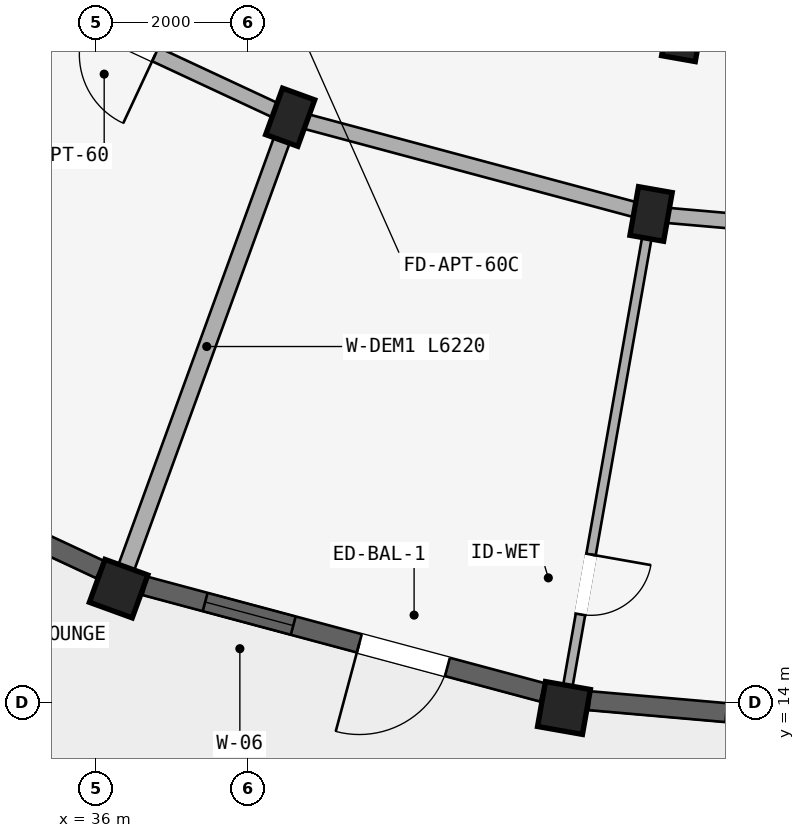
"""IFC4 building model, lengths in metres.
Left out: names, types, materials, properties, quantities, classifications, styles, units other than length and angle.
Written with IfcOpenShell. Run it as: python <this file> out.ifc"""

import sys

from ifc_helpers import new_model, si_unit, direction, frame, frame_2d, origin, origin_2d, place, context, subcontext, project, spatial, rectangle, extrude, element, fill, save


model = new_model("IFC4")
c1 = context("Model", 3, precision=1e-05, world=origin(), true_north=direction((0.0, 1.0)))
c2 = subcontext(c1, "Body", "Model", "MODEL_VIEW")
j1 = project(units=[si_unit("LENGTHUNIT", "METRE"), si_unit("PLANEANGLEUNIT", "RADIAN")], contexts=[c1])
p1 = place(None, origin())
s1 = spatial("IfcSite", under=j1, at=p1, CompositionType="ELEMENT")
p2 = place(p1, origin())
s2 = spatial("IfcBuilding", under=s1, at=p2, CompositionType="ELEMENT")
p3 = place(p2, frame((0.0, 0.0, 30.75)))
s3 = spatial("IfcBuildingStorey", under=s2, at=p3, CompositionType="ELEMENT", Elevation=30.75)
for number, where, z_axis, x_axis in (
    (1, (43.72, 22.792, 0.0), (0.0, 0.0, 1.0), (-0.985, 0.174, 0.0)),
    (2, (43.303, 20.428, 0.0), (0.0, 0.0, 1.0), (-0.985, 0.174, 0.0)),
):
    element("IfcColumn", number, at=place(p3, frame(where, z_axis=z_axis, x_axis=x_axis)), inside=s3, PredefinedType="COLUMN", context=c2, shape_type="SweptSolid", body=[
        extrude(rectangle(XDim=0.45, YDim=0.65, at=origin_2d()), origin(), (0.0, 0.0, 1.0), 2.91),
    ])
p4 = place(p3, frame((42.157, 13.929, 0.0), z_axis=(0.0, 0.0, 1.0), x_axis=(-0.984807753012, 0.173648177667, 0.0)))
e3 = element("IfcColumn", 3, at=p4, inside=s3, PredefinedType="COLUMN", context=c2, shape_type="SweptSolid", body=[
    extrude(rectangle(XDim=0.6, YDim=0.6, at=origin_2d()), origin(), (0.0, 0.0, 1.0), 2.91),
])
p5 = place(p3, frame((38.555, 21.701, 0.0), z_axis=(0.0, 0.0, 1.0), x_axis=(-0.939692620786, 0.342020143326, 0.0)))
e4 = element("IfcColumn", 4, at=p5, inside=s3, PredefinedType="COLUMN", context=c2, shape_type="SweptSolid", body=[
    extrude(rectangle(XDim=0.45, YDim=0.65, at=origin_2d()), origin(), (0.0, 0.0, 1.0), 2.91),
])
p6 = place(p3, frame((36.298, 15.499, 0.0), z_axis=(0.0, 0.0, 1.0), x_axis=(-0.939692620786, 0.342020143326, 0.0)))
e5 = element("IfcColumn", 5, at=p6, inside=s3, PredefinedType="COLUMN", context=c2, shape_type="SweptSolid", body=[
    extrude(rectangle(XDim=0.6, YDim=0.6, at=origin_2d()), origin(), (0.0, 0.0, 1.0), 2.91),
])
p7 = place(p3, frame((48.2, 22.4, 0.0), z_axis=(0.0, 0.0, 1.0), x_axis=(-0.996191949488, 0.087187153726, 0.0)))
e6 = element("IfcWall", 6, at=p7, inside=s3, PredefinedType="STANDARD", context=c2, shape_type="SweptSolid", body=[
    extrude(rectangle(XDim=4.497, YDim=0.2, at=frame_2d((2.249, 0.0))), origin(), (0.0, 0.0, 1.0), 2.352),
])
p8 = place(p7, frame((1.729, 0.0, 0.0)))
e7 = element("IfcOpeningElement", 7, at=p8, cuts=e6, PredefinedType="OPENING", context=c2, shape_type="SweptSolid", body=[
    extrude(rectangle(XDim=1.04, YDim=2.15, at=frame_2d((0.52, 1.075))), frame((0.0, 0.11, 0.0), z_axis=(0.0, -1.0, 0.0), x_axis=(1.0, 0.0, 0.0)), (0.0, 0.0, 1.0), 0.22),
])
p9 = place(p3, frame((48.2, 20.0, 0.0), z_axis=(0.0, 0.0, 1.0), x_axis=(-0.996193663584, 0.087167566415, 0.0)))
e8 = element("IfcWall", 8, at=p9, inside=s3, PredefinedType="STANDARD", context=c2, shape_type="SweptSolid", body=[
    extrude(rectangle(XDim=4.916, YDim=0.2, at=frame_2d((2.458, 0.0))), origin(), (0.0, 0.0, 1.0), 2.352),
])
p10 = place(p9, frame((1.888, 0.0, 0.0)))
e9 = element("IfcOpeningElement", 9, at=p10, cuts=e8, PredefinedType="OPENING", context=c2, shape_type="SweptSolid", body=[
    extrude(rectangle(XDim=1.14, YDim=2.15, at=frame_2d((0.57, 1.075))), frame((0.0, 0.11, 0.0), z_axis=(0.0, -1.0, 0.0), x_axis=(1.0, 0.0, 0.0)), (0.0, 0.0, 1.0), 0.22),
])
p11 = place(p3, frame((43.303, 20.428, 0.0), z_axis=(0.0, 0.0, 1.0), x_axis=(-0.965930095386, 0.258803112091, 0.0)))
e10 = element("IfcWall", 10, at=p11, inside=s3, PredefinedType="STANDARD", context=c2, shape_type="SweptSolid", body=[
    extrude(rectangle(XDim=4.916, YDim=0.2, at=frame_2d((2.458, 0.0))), origin(), (0.0, 0.0, 1.0), 2.352),
])
p12 = place(p3, frame((38.555, 21.701, 0.0), z_axis=(0.0, 0.0, 1.0), x_axis=(-0.906302381024, 0.422629854778, 0.0)))
e11 = element("IfcWall", 11, at=p12, inside=s3, PredefinedType="STANDARD", context=c2, shape_type="SweptSolid", body=[
    extrude(rectangle(XDim=4.915, YDim=0.2, at=frame_2d((2.458, 0.0))), origin(), (0.0, 0.0, 1.0), 2.352),
])
p13 = place(p12, frame((1.958, 0.0, 0.0)))
e12 = element("IfcOpeningElement", 12, at=p13, cuts=e11, PredefinedType="OPENING", context=c2, shape_type="SweptSolid", body=[
    extrude(rectangle(XDim=1.0, YDim=2.15, at=frame_2d((0.5, 1.075))), frame((0.0, 0.11, 0.0), z_axis=(0.0, -1.0, 0.0), x_axis=(1.0, 0.0, 0.0)), (0.0, 0.0, 1.0), 0.22),
])
p14 = place(p3, frame((43.286, 20.33, 0.0), z_axis=(0.0, 0.0, 1.0), x_axis=(-0.173646504755, -0.98480804799, 0.0)))
e13 = element("IfcWall", 13, at=p14, inside=s3, PredefinedType="PARTITIONING", context=c2, shape_type="SweptSolid", body=[
    extrude(rectangle(XDim=6.22, YDim=0.125, at=frame_2d((3.11, 0.0))), origin(), (0.0, 0.0, 1.0), 2.352),
])
p15 = place(p14, frame((4.45, 0.0, 0.0)))
e14 = element("IfcOpeningElement", 14, at=p15, cuts=e13, PredefinedType="OPENING", context=c2, shape_type="SweptSolid", body=[
    extrude(rectangle(XDim=0.8, YDim=2.1, at=frame_2d((0.4, 1.05))), frame((0.0, 0.073, 0.0), z_axis=(0.0, -1.0, 0.0), x_axis=(1.0, 0.0, 0.0)), (0.0, 0.0, 1.0), 0.145),
])
p16 = place(p3, frame((38.521, 21.607, 0.0), z_axis=(0.0, 0.0, 1.0), x_axis=(-0.341992021352, -0.939702855871, 0.0)))
e15 = element("IfcWall", 15, at=p16, inside=s3, PredefinedType="STANDARD", context=c2, shape_type="SweptSolid", body=[
    extrude(rectangle(XDim=6.22, YDim=0.22, at=frame_2d((3.11, 0.0))), origin(), (0.0, 0.0, 1.0), 2.352),
])
p17 = place(p3, frame((48.066, 13.537, 0.0), z_axis=(0.0, 0.0, 1.0), x_axis=(-0.996192628107, 0.087179399543, 0.0)))
e16 = element("IfcWall", 16, at=p17, inside=s3, PredefinedType="STANDARD", context=c2, shape_type="SweptSolid", body=[
    extrude(rectangle(XDim=5.595, YDim=0.25, at=frame_2d((2.798, 0.0))), origin(), (0.0, 0.0, 1.0), 2.352),
])
p18 = place(p17, frame((1.988, 0.0, 0.502)))
e17 = element("IfcOpeningElement", 17, at=p18, cuts=e16, PredefinedType="OPENING", context=c2, shape_type="SweptSolid", body=[
    extrude(rectangle(XDim=1.8, YDim=1.65, at=frame_2d((0.9, 0.825))), frame((0.0, 0.135, 0.0), z_axis=(0.0, -1.0, 0.0), x_axis=(1.0, 0.0, 0.0)), (0.0, 0.0, 1.0), 0.27),
])
p19 = place(p3, frame((41.875, 14.134, 0.0), z_axis=(0.0, 0.0, 1.0), x_axis=(-0.965928932241, 0.258807453254, 0.0)))
e18 = element("IfcWall", 18, at=p19, inside=s3, PredefinedType="STANDARD", context=c2, shape_type="SweptSolid", body=[
    extrude(rectangle(XDim=5.415, YDim=0.25, at=frame_2d((2.708, 0.0))), origin(), (0.0, 0.0, 1.0), 2.352),
])
p20 = place(p19, frame((3.395, 0.0, 0.402)))
e19 = element("IfcOpeningElement", 19, at=p20, cuts=e18, PredefinedType="OPENING", context=c2, shape_type="SweptSolid", body=[
    extrude(rectangle(XDim=1.2, YDim=1.5, at=frame_2d((0.6, 0.75))), frame((0.0, 0.135, 0.0), z_axis=(0.0, -1.0, 0.0), x_axis=(1.0, 0.0, 0.0)), (0.0, 0.0, 1.0), 0.27),
])
p21 = place(p19, frame((1.295, 0.0, 0.0)))
e20 = element("IfcOpeningElement", 20, at=p21, cuts=e18, PredefinedType="OPENING", context=c2, shape_type="SweptSolid", body=[
    extrude(rectangle(XDim=1.2, YDim=2.15, at=frame_2d((0.6, 1.075))), frame((0.0, 0.135, 0.0), z_axis=(0.0, -1.0, 0.0), x_axis=(1.0, 0.0, 0.0)), (0.0, 0.0, 1.0), 0.27),
])
p22 = place(p3, frame((36.055, 15.75, 0.0), z_axis=(0.0, 0.0, 1.0), x_axis=(-0.90629483869, 0.42264602845, 0.0)))
e21 = element("IfcWall", 21, at=p22, inside=s3, PredefinedType="STANDARD", context=c2, shape_type="SweptSolid", body=[
    extrude(rectangle(XDim=5.415, YDim=0.25, at=frame_2d((2.708, 0.0))), origin(), (0.0, 0.0, 1.0), 2.352),
])
p23 = place(p22, frame((1.807, 0.0, 0.502)))
e22 = element("IfcOpeningElement", 22, at=p23, cuts=e21, PredefinedType="OPENING", context=c2, shape_type="SweptSolid", body=[
    extrude(rectangle(XDim=1.8, YDim=1.65, at=frame_2d((0.9, 0.825))), frame((0.0, 0.135, 0.0), z_axis=(0.0, -1.0, 0.0), x_axis=(1.0, 0.0, 0.0)), (0.0, 0.0, 1.0), 0.27),
])
p24 = place(p20, origin())
e23 = element("IfcWindow", 23, at=p24, inside=s3, PartitioningType="SINGLE_PANEL", PredefinedType="WINDOW", context=c2, shape_type="SweptSolid", body=[
    extrude(rectangle(XDim=1.2, YDim=1.5, at=frame_2d((0.6, 0.75))), frame((0.0, 0.03, 0.0), z_axis=(0.0, -1.0, 0.0), x_axis=(1.0, 0.0, 0.0)), (0.0, 0.0, 1.0), 0.06),
])
fill(e19, e23)
p25 = place(p15, origin())
e24 = element("IfcDoor", 24, at=p25, inside=s3, OperationType="SINGLE_SWING_LEFT", PredefinedType="DOOR", context=c2, shape_type="SweptSolid", body=[
    extrude(rectangle(XDim=0.8, YDim=2.1, at=frame_2d((0.4, 1.05))), frame((0.0, 0.025, 0.0), z_axis=(0.0, -1.0, 0.0), x_axis=(1.0, 0.0, 0.0)), (0.0, 0.0, 1.0), 0.05),
])
fill(e14, e24)
p26 = place(p13, frame((1.0, 0.0, 0.0), z_axis=(0.0, 0.0, 1.0), x_axis=(-1.0, 0.0, 0.0)))
e25 = element("IfcDoor", 25, at=p26, inside=s3, OperationType="SINGLE_SWING_RIGHT", PredefinedType="DOOR", context=c2, shape_type="SweptSolid", body=[
    extrude(rectangle(XDim=1.0, YDim=2.15, at=frame_2d((0.5, 1.075))), frame((0.0, 0.025, 0.0), z_axis=(0.0, -1.0, 0.0), x_axis=(1.0, 0.0, 0.0)), (0.0, 0.0, 1.0), 0.05),
])
fill(e12, e25)
p27 = place(p21, origin())
e26 = element("IfcDoor", 26, at=p27, inside=s3, OperationType="SINGLE_SWING_RIGHT", PredefinedType="DOOR", context=c2, shape_type="SweptSolid", body=[
    extrude(rectangle(XDim=1.2, YDim=2.15, at=frame_2d((0.6, 1.075))), frame((0.0, 0.025, 0.0), z_axis=(0.0, -1.0, 0.0), x_axis=(1.0, 0.0, 0.0)), (0.0, 0.0, 1.0), 0.05),
])
fill(e20, e26)
save(model, sys.argv[1])
